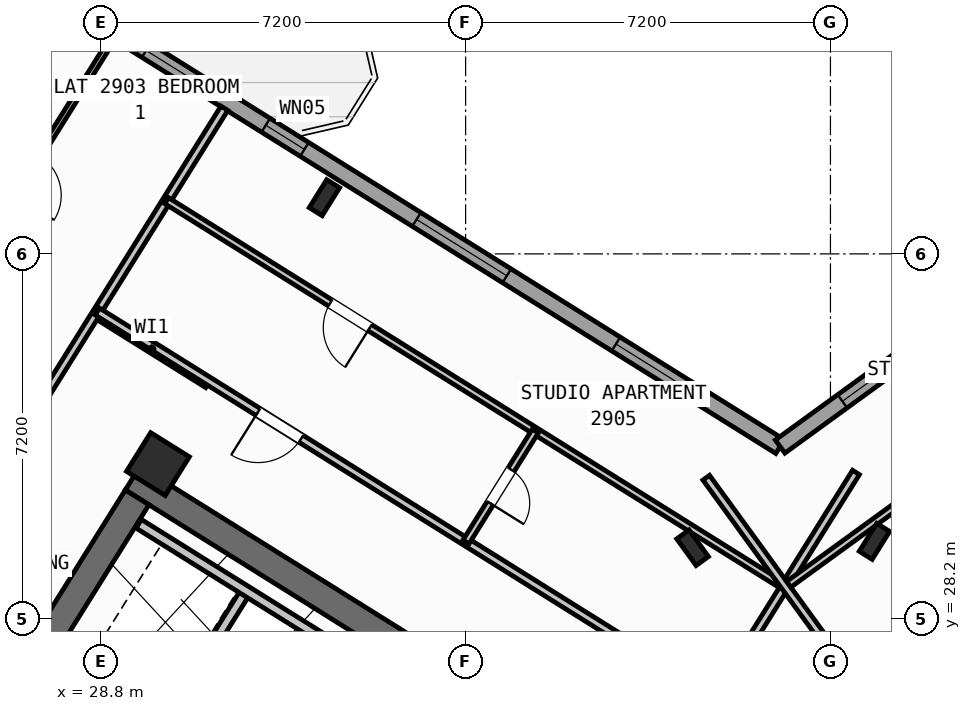
"""IFC4 building model, lengths in metres.
Left out: names, types, materials, properties, quantities, classifications, styles, units other than length and angle.
Written with IfcOpenShell. Run it as: python <this file> out.ifc"""

import sys

from ifc_helpers import new_model, si_unit, direction, frame, frame_2d, origin, origin_2d, place, context, subcontext, project, spatial, rectangle, hollow_rectangle, i_section, extrude, source, transform, mapped, element, fill, save


model = new_model("IFC4")
c1 = context("Model", 3, precision=1e-05, world=origin(), true_north=direction((0.0, 1.0)))
c2 = subcontext(c1, "Body", "Model", "MODEL_VIEW")
j1 = project(units=[si_unit("LENGTHUNIT", "METRE"), si_unit("PLANEANGLEUNIT", "RADIAN")], contexts=[c1])
p1 = place(None, origin())
s1 = spatial("IfcSite", under=j1, at=p1, CompositionType="ELEMENT")
p2 = place(p1, origin())
s2 = spatial("IfcBuilding", under=s1, at=p2, CompositionType="ELEMENT")
p3 = place(p2, frame((0.0, 0.0, 116.1)))
s3 = spatial("IfcBuildingStorey", under=s2, at=p3, CompositionType="ELEMENT", Elevation=116.1)
p4 = place(p3, frame((40.573, 24.01, 0.0), z_axis=(0.0, 0.0, 1.0), x_axis=(-0.848047359947, 0.529920442413, 0.0)))
e1 = element("IfcWall", 1, at=p4, inside=s3, PredefinedType="SHEAR", context=c2, shape_type="SweptSolid", body=[
    extrude(rectangle(XDim=13.14, YDim=0.55, at=frame_2d((6.57, 0.0))), origin(), (0.0, 0.0, 1.0), 3.35),
])
p5 = place(p3, frame((29.517, 30.594, 0.0), z_axis=(0.0, 0.0, 1.0), x_axis=(-0.529906864564, -0.848055844204, 0.0)))
e2 = element("IfcWall", 2, at=p5, inside=s3, PredefinedType="SHEAR", context=c2, shape_type="SweptSolid", body=[
    extrude(rectangle(XDim=3.575, YDim=0.55, at=frame_2d((1.788, 0.0))), origin(), (0.0, 0.0, 1.0), 3.35),
])
p6 = place(p3, frame((44.365, 24.142, 0.0), z_axis=(0.0, 0.0, 1.0), x_axis=(0.809024304885, 0.587775190107, 0.0)))
e3 = element("IfcWall", 3, at=p6, inside=s3, PredefinedType="SHEAR", context=c2, shape_type="SweptSolid", body=[
    extrude(rectangle(XDim=12.34, YDim=0.55, at=frame_2d((6.17, 0.0))), origin(), (0.0, 0.0, 1.0), 3.35),
])
m1 = source(origin(), c2, "Body", "SweptSolid", [
    extrude(i_section(OverallWidth=0.3, OverallDepth=0.65, WebThickness=0.016, FlangeThickness=0.031, at=origin_2d()), origin(), (0.0, 0.0, 1.0), 3.6),
])
for number, where, z_axis, x_axis in (
    (4, (44.068, 29.726, 0.0), (0.0, 0.0, 1.0), (-0.848, 0.53, 0.0)),
    (5, (33.213, 36.509, 0.0), (0.0, 0.0, 1.0), (-0.848, 0.53, 0.0)),
):
    element("IfcColumn", number, at=place(p3, frame(where, z_axis=z_axis, x_axis=x_axis)), inside=s3, PredefinedType="COLUMN", context=c2, shape_type="MappedRepresentation", body=[
        mapped(m1, transform((0.0, 0.0, 0.0), scale=1.0)),
    ])
m2 = source(origin(), c2, "Body", "SweptSolid", [
    extrude(hollow_rectangle(XDim=0.9, YDim=0.9, WallThickness=0.036, at=origin_2d()), origin(), (0.0, 0.0, 1.0), 3.6),
])
p7 = place(p3, frame((29.928, 31.251, 0.0), z_axis=(0.0, 0.0, 1.0), x_axis=(-0.848048096156, 0.529919264233, 0.0)))
e6 = element("IfcColumn", 6, at=p7, inside=s3, PredefinedType="COLUMN", context=c2, shape_type="MappedRepresentation", body=[
    mapped(m2, transform((0.0, 0.0, 0.0), scale=1.0)),
])
p8 = place(p3, frame((40.479, 29.601, 0.0), z_axis=(0.0, 0.0, 1.0), x_axis=(0.809016994375, 0.587785252292, 0.0)))
e7 = element("IfcColumn", 7, at=p8, inside=s3, PredefinedType="COLUMN", context=c2, shape_type="MappedRepresentation", body=[
    mapped(m1, transform((0.0, 0.0, 0.0), scale=1.0)),
])
p9 = place(p3, frame((31.76, 12.183, 0.0), z_axis=(0.0, 0.0, 1.0), x_axis=(-0.848047074256, 0.529920899612, 0.0)))
e8 = element("IfcWall", 8, at=p9, inside=s3, PredefinedType="STANDARD", context=c2, shape_type="SweptSolid", body=[
    extrude(rectangle(XDim=30.652, YDim=0.32, at=frame_2d((15.326, 0.0))), origin(), (0.0, 0.0, 1.0), 3.35),
])
p10 = place(p9, frame((15.153, 0.0, 0.0)))
e9 = element("IfcOpeningElement", 9, at=p10, cuts=e8, PredefinedType="OPENING", context=c2, shape_type="SweptSolid", body=[
    extrude(rectangle(XDim=1.2, YDim=2.15, at=frame_2d((0.6, 1.075))), frame((0.0, 0.17, 0.0), z_axis=(0.0, -1.0, 0.0), x_axis=(1.0, 0.0, 0.0)), (0.0, 0.0, 1.0), 0.34),
])
p11 = place(p9, frame((2.002, 0.0, 0.8)))
e10 = element("IfcOpeningElement", 10, at=p11, cuts=e8, PredefinedType="OPENING", context=c2, shape_type="SweptSolid", body=[
    extrude(rectangle(XDim=2.1, YDim=1.55, at=frame_2d((1.05, 0.775))), frame((0.0, 0.17, 0.0), z_axis=(0.0, -1.0, 0.0), x_axis=(1.0, 0.0, 0.0)), (0.0, 0.0, 1.0), 0.34),
])
p12 = place(p9, frame((7.206, 0.0, 0.8)))
e11 = element("IfcOpeningElement", 11, at=p12, cuts=e8, PredefinedType="OPENING", context=c2, shape_type="SweptSolid", body=[
    extrude(rectangle(XDim=2.1, YDim=1.55, at=frame_2d((1.05, 0.775))), frame((0.0, 0.17, 0.0), z_axis=(0.0, -1.0, 0.0), x_axis=(1.0, 0.0, 0.0)), (0.0, 0.0, 1.0), 0.34),
])
p13 = place(p9, frame((12.648, 0.0, 1.0)))
e12 = element("IfcOpeningElement", 12, at=p13, cuts=e8, PredefinedType="OPENING", context=c2, shape_type="SweptSolid", body=[
    extrude(rectangle(XDim=0.9, YDim=1.25, at=frame_2d((0.45, 0.625))), frame((0.0, 0.17, 0.0), z_axis=(0.0, -1.0, 0.0), x_axis=(1.0, 0.0, 0.0)), (0.0, 0.0, 1.0), 0.34),
])
p14 = place(p9, frame((19.458, 0.0, 0.95)))
e13 = element("IfcOpeningElement", 13, at=p14, cuts=e8, PredefinedType="OPENING", context=c2, shape_type="SweptSolid", body=[
    extrude(rectangle(XDim=1.2, YDim=1.4, at=frame_2d((0.6, 0.7))), frame((0.0, 0.17, 0.0), z_axis=(0.0, -1.0, 0.0), x_axis=(1.0, 0.0, 0.0)), (0.0, 0.0, 1.0), 0.34),
])
p15 = place(p9, frame((21.858, 0.0, 0.95)))
e14 = element("IfcOpeningElement", 14, at=p15, cuts=e8, PredefinedType="OPENING", context=c2, shape_type="SweptSolid", body=[
    extrude(rectangle(XDim=1.2, YDim=1.4, at=frame_2d((0.6, 0.7))), frame((0.0, 0.17, 0.0), z_axis=(0.0, -1.0, 0.0), x_axis=(1.0, 0.0, 0.0)), (0.0, 0.0, 1.0), 0.34),
])
p16 = place(p9, frame((27.266, 0.0, 0.8)))
e15 = element("IfcOpeningElement", 15, at=p16, cuts=e8, PredefinedType="OPENING", context=c2, shape_type="SweptSolid", body=[
    extrude(rectangle(XDim=2.1, YDim=1.55, at=frame_2d((1.05, 0.775))), frame((0.0, 0.17, 0.0), z_axis=(0.0, -1.0, 0.0), x_axis=(1.0, 0.0, 0.0)), (0.0, 0.0, 1.0), 0.34),
])
p17 = place(p3, frame((17.424, 47.083, 0.0), z_axis=(0.0, 0.0, 1.0), x_axis=(0.848049927979, -0.529916332693, 0.0)))
e16 = element("IfcWall", 16, at=p17, inside=s3, PredefinedType="STANDARD", context=c2, shape_type="SweptSolid", body=[
    extrude(rectangle(XDim=29.223, YDim=0.32, at=frame_2d((14.612, 0.0))), origin(), (0.0, 0.0, 1.0), 3.35),
])
p18 = place(p17, frame((8.839, 0.0, 0.0)))
e17 = element("IfcOpeningElement", 17, at=p18, cuts=e16, PredefinedType="OPENING", context=c2, shape_type="SweptSolid", body=[
    extrude(rectangle(XDim=1.05, YDim=2.15, at=frame_2d((0.525, 1.075))), frame((0.0, 0.17, 0.0), z_axis=(0.0, -1.0, 0.0), x_axis=(1.0, 0.0, 0.0)), (0.0, 0.0, 1.0), 0.34),
])
p19 = place(p17, frame((0.719, 0.0, 0.85)))
e18 = element("IfcOpeningElement", 18, at=p19, cuts=e16, PredefinedType="OPENING", context=c2, shape_type="SweptSolid", body=[
    extrude(rectangle(XDim=1.8, YDim=1.5, at=frame_2d((0.9, 0.75))), frame((0.0, 0.17, 0.0), z_axis=(0.0, -1.0, 0.0), x_axis=(1.0, 0.0, 0.0)), (0.0, 0.0, 1.0), 0.34),
])
p20 = place(p17, frame((3.981, 0.0, 0.85)))
e19 = element("IfcOpeningElement", 19, at=p20, cuts=e16, PredefinedType="OPENING", context=c2, shape_type="SweptSolid", body=[
    extrude(rectangle(XDim=1.5, YDim=1.5, at=frame_2d((0.75, 0.75))), frame((0.0, 0.17, 0.0), z_axis=(0.0, -1.0, 0.0), x_axis=(1.0, 0.0, 0.0)), (0.0, 0.0, 1.0), 0.34),
])
p21 = place(p17, frame((7.021, 0.0, 0.95)))
e20 = element("IfcOpeningElement", 20, at=p21, cuts=e16, PredefinedType="OPENING", context=c2, shape_type="SweptSolid", body=[
    extrude(rectangle(XDim=1.2, YDim=1.4, at=frame_2d((0.6, 0.7))), frame((0.0, 0.17, 0.0), z_axis=(0.0, -1.0, 0.0), x_axis=(1.0, 0.0, 0.0)), (0.0, 0.0, 1.0), 0.34),
])
p22 = place(p17, frame((14.471, 0.0, 0.95)))
e21 = element("IfcOpeningElement", 21, at=p22, cuts=e16, PredefinedType="OPENING", context=c2, shape_type="SweptSolid", body=[
    extrude(rectangle(XDim=1.2, YDim=1.4, at=frame_2d((0.6, 0.7))), frame((0.0, 0.17, 0.0), z_axis=(0.0, -1.0, 0.0), x_axis=(1.0, 0.0, 0.0)), (0.0, 0.0, 1.0), 0.34),
])
p23 = place(p17, frame((17.254, 0.0, 1.0)))
e22 = element("IfcOpeningElement", 22, at=p23, cuts=e16, PredefinedType="OPENING", context=c2, shape_type="SweptSolid", body=[
    extrude(rectangle(XDim=0.9, YDim=1.25, at=frame_2d((0.45, 0.625))), frame((0.0, 0.17, 0.0), z_axis=(0.0, -1.0, 0.0), x_axis=(1.0, 0.0, 0.0)), (0.0, 0.0, 1.0), 0.34),
])
p24 = place(p17, frame((20.764, 0.0, 0.8)))
e23 = element("IfcOpeningElement", 23, at=p24, cuts=e16, PredefinedType="OPENING", context=c2, shape_type="SweptSolid", body=[
    extrude(rectangle(XDim=2.1, YDim=1.55, at=frame_2d((1.05, 0.775))), frame((0.0, 0.17, 0.0), z_axis=(0.0, -1.0, 0.0), x_axis=(1.0, 0.0, 0.0)), (0.0, 0.0, 1.0), 0.34),
])
p25 = place(p17, frame((25.403, 0.0, 0.8)))
e24 = element("IfcOpeningElement", 24, at=p25, cuts=e16, PredefinedType="OPENING", context=c2, shape_type="SweptSolid", body=[
    extrude(rectangle(XDim=2.1, YDim=1.55, at=frame_2d((1.05, 0.775))), frame((0.0, 0.17, 0.0), z_axis=(0.0, -1.0, 0.0), x_axis=(1.0, 0.0, 0.0)), (0.0, 0.0, 1.0), 0.34),
])
p26 = place(p3, frame((42.207, 31.597, 0.0), z_axis=(0.0, 0.0, 1.0), x_axis=(0.809020333377, 0.587780656523, 0.0)))
e25 = element("IfcWall", 25, at=p26, inside=s3, PredefinedType="STANDARD", context=c2, shape_type="SweptSolid", body=[
    extrude(rectangle(XDim=15.223, YDim=0.32, at=frame_2d((7.611, 0.0))), origin(), (0.0, 0.0, 1.0), 3.35),
])
p27 = place(p26, frame((12.82, 0.0, 0.0)))
e26 = element("IfcOpeningElement", 26, at=p27, cuts=e25, PredefinedType="OPENING", context=c2, shape_type="SweptSolid", body=[
    extrude(rectangle(XDim=1.05, YDim=2.15, at=frame_2d((0.525, 1.075))), frame((0.0, 0.17, 0.0), z_axis=(0.0, -1.0, 0.0), x_axis=(1.0, 0.0, 0.0)), (0.0, 0.0, 1.0), 0.34),
])
p28 = place(p26, frame((1.52, 0.0, 0.8)))
e27 = element("IfcOpeningElement", 27, at=p28, cuts=e25, PredefinedType="OPENING", context=c2, shape_type="SweptSolid", body=[
    extrude(rectangle(XDim=2.1, YDim=1.55, at=frame_2d((1.05, 0.775))), frame((0.0, 0.17, 0.0), z_axis=(0.0, -1.0, 0.0), x_axis=(1.0, 0.0, 0.0)), (0.0, 0.0, 1.0), 0.34),
])
p29 = place(p26, frame((5.76, 0.0, 0.8)))
e28 = element("IfcOpeningElement", 28, at=p29, cuts=e25, PredefinedType="OPENING", context=c2, shape_type="SweptSolid", body=[
    extrude(rectangle(XDim=2.1, YDim=1.55, at=frame_2d((1.05, 0.775))), frame((0.0, 0.17, 0.0), z_axis=(0.0, -1.0, 0.0), x_axis=(1.0, 0.0, 0.0)), (0.0, 0.0, 1.0), 0.34),
])
p30 = place(p26, frame((10.219, 0.0, 1.0)))
e29 = element("IfcOpeningElement", 29, at=p30, cuts=e25, PredefinedType="OPENING", context=c2, shape_type="SweptSolid", body=[
    extrude(rectangle(XDim=0.9, YDim=1.25, at=frame_2d((0.45, 0.625))), frame((0.0, 0.17, 0.0), z_axis=(0.0, -1.0, 0.0), x_axis=(1.0, 0.0, 0.0)), (0.0, 0.0, 1.0), 0.34),
])
p31 = place(p3, frame((31.645, 28.716, 0.0), z_axis=(0.0, 0.0, 1.0), x_axis=(-0.52986693015, -0.848080795876, 0.0)))
e30 = element("IfcWall", 30, at=p31, inside=s3, PredefinedType="STANDARD", context=c2, shape_type="SweptSolid", body=[
    extrude(rectangle(XDim=2.66, YDim=0.2, at=frame_2d((1.33, 0.0))), origin(), (0.0, 0.0, 1.0), 3.34),
])
p32 = place(p3, frame((33.363, 27.69, 0.0), z_axis=(0.0, 0.0, 1.0), x_axis=(-0.848047090064, 0.529920874315, 0.0)))
e31 = element("IfcWall", 31, at=p32, inside=s3, PredefinedType="STANDARD", context=c2, shape_type="SweptSolid", body=[
    extrude(rectangle(XDim=4.498, YDim=0.2, at=frame_2d((2.249, 0.0))), origin(), (0.0, 0.0, 1.0), 3.34),
])
p33 = place(p3, frame((30.914, 32.829, 0.0), z_axis=(0.0, 0.0, 1.0), x_axis=(-0.848008813643, 0.529982124211, 0.0)))
e32 = element("IfcWall", 32, at=p33, inside=s3, PredefinedType="PARTITIONING", context=c2, shape_type="SweptSolid", body=[
    extrude(rectangle(XDim=2.61, YDim=0.16, at=frame_2d((1.305, 0.0))), origin(), (0.0, 0.0, 1.0), 3.34),
])
p34 = place(p3, frame((31.239, 38.274, 0.0), z_axis=(0.0, 0.0, 1.0), x_axis=(-0.529920220799, -0.848047498427, 0.0)))
e33 = element("IfcWall", 33, at=p34, inside=s3, PredefinedType="PARTITIONING", context=c2, shape_type="SweptSolid", body=[
    extrude(rectangle(XDim=9.2, YDim=0.16, at=frame_2d((4.6, 0.0))), origin(), (0.0, 0.0, 1.0), 3.34),
])
p35 = place(p3, frame((29.177, 39.881, 0.0), z_axis=(0.0, 0.0, 1.0), x_axis=(-0.529930649952, -0.848040981463, 0.0)))
e34 = element("IfcWall", 34, at=p35, inside=s3, PredefinedType="PARTITIONING", context=c2, shape_type="SweptSolid", body=[
    extrude(rectangle(XDim=7.07, YDim=0.11, at=frame_2d((3.535, 0.0))), origin(), (0.0, 0.0, 1.0), 3.34),
])
p36 = place(p35, frame((3.0, 0.0, 0.0)))
e35 = element("IfcOpeningElement", 35, at=p36, cuts=e34, PredefinedType="OPENING", context=c2, shape_type="SweptSolid", body=[
    extrude(rectangle(XDim=0.92, YDim=2.08, at=frame_2d((0.46, 1.04))), frame((0.0, 0.065, 0.0), z_axis=(0.0, -1.0, 0.0), x_axis=(1.0, 0.0, 0.0)), (0.0, 0.0, 1.0), 0.13),
])
p37 = place(p3, frame((41.936, 26.012, 0.0), z_axis=(0.0, 0.0, 1.0), x_axis=(-0.848051154596, 0.529914369676, 0.0)))
e36 = element("IfcWall", 36, at=p37, inside=s3, PredefinedType="PARTITIONING", context=c2, shape_type="SweptSolid", body=[
    extrude(rectangle(XDim=15.57, YDim=0.16, at=frame_2d((7.785, 0.0))), origin(), (0.0, 0.0, 1.0), 3.34),
])
p38 = place(p37, frame((10.83, 0.0, 0.0)))
e37 = element("IfcOpeningElement", 37, at=p38, cuts=e36, PredefinedType="OPENING", context=c2, shape_type="SweptSolid", body=[
    extrude(rectangle(XDim=1.0, YDim=2.1, at=frame_2d((0.5, 1.05))), frame((0.0, 0.09, 0.0), z_axis=(0.0, -1.0, 0.0), x_axis=(1.0, 0.0, 0.0)), (0.0, 0.0, 1.0), 0.18),
])
p39 = place(p3, frame((43.704, 31.086, 0.0), z_axis=(0.0, 0.0, 1.0), x_axis=(-0.529906828443, -0.848055866774, 0.0)))
e38 = element("IfcWall", 38, at=p39, inside=s3, PredefinedType="PARTITIONING", context=c2, shape_type="SweptSolid", body=[
    extrude(rectangle(XDim=5.48, YDim=0.16, at=frame_2d((2.74, 0.0))), origin(), (0.0, 0.0, 1.0), 3.34),
])
p40 = place(p3, frame((42.226, 28.873, 0.0), z_axis=(0.0, 0.0, 1.0), x_axis=(-0.848049134363, 0.529917602752, 0.0)))
e39 = element("IfcWall", 39, at=p40, inside=s3, PredefinedType="PLUMBINGWALL", context=c2, shape_type="SweptSolid", body=[
    extrude(rectangle(XDim=14.3, YDim=0.14, at=frame_2d((7.15, 0.0))), origin(), (0.0, 0.0, 1.0), 3.34),
])
p41 = place(p40, frame((9.57, 0.0, 0.0)))
e40 = element("IfcOpeningElement", 40, at=p41, cuts=e39, PredefinedType="OPENING", context=c2, shape_type="SweptSolid", body=[
    extrude(rectangle(XDim=0.92, YDim=2.08, at=frame_2d((0.46, 1.04))), frame((0.0, 0.08, 0.0), z_axis=(0.0, -1.0, 0.0), x_axis=(1.0, 0.0, 0.0)), (0.0, 0.0, 1.0), 0.16),
])
p42 = place(p3, frame((37.375, 31.904, 0.0), z_axis=(0.0, 0.0, 1.0), x_axis=(-0.529913878929, -0.848051461244, 0.0)))
e41 = element("IfcWall", 41, at=p42, inside=s3, PredefinedType="PLUMBINGWALL", context=c2, shape_type="SweptSolid", body=[
    extrude(rectangle(XDim=2.58, YDim=0.14, at=frame_2d((1.29, 0.0))), origin(), (0.0, 0.0, 1.0), 3.34),
])
p43 = place(p42, frame((0.9, 0.0, 0.0)))
e42 = element("IfcOpeningElement", 42, at=p43, cuts=e41, PredefinedType="OPENING", context=c2, shape_type="SweptSolid", body=[
    extrude(rectangle(XDim=0.78, YDim=2.05, at=frame_2d((0.39, 1.025))), frame((0.0, 0.08, 0.0), z_axis=(0.0, -1.0, 0.0), x_axis=(1.0, 0.0, 0.0)), (0.0, 0.0, 1.0), 0.16),
])
p44 = place(p3, frame((42.866, 26.044, 0.0), z_axis=(0.0, 0.0, 1.0), x_axis=(0.809020254154, 0.587780765566, 0.0)))
e43 = element("IfcWall", 43, at=p44, inside=s3, PredefinedType="PARTITIONING", context=c2, shape_type="SweptSolid", body=[
    extrude(rectangle(XDim=14.67, YDim=0.16, at=frame_2d((7.335, 0.0))), origin(), (0.0, 0.0, 1.0), 3.34),
])
p45 = place(p44, frame((10.2, 0.0, 0.0)))
e44 = element("IfcOpeningElement", 44, at=p45, cuts=e43, PredefinedType="OPENING", context=c2, shape_type="SweptSolid", body=[
    extrude(rectangle(XDim=1.0, YDim=2.1, at=frame_2d((0.5, 1.05))), frame((0.0, 0.09, 0.0), z_axis=(0.0, -1.0, 0.0), x_axis=(1.0, 0.0, 0.0)), (0.0, 0.0, 1.0), 0.18),
])
p46 = place(p3, frame((43.969, 26.55, 0.0), z_axis=(0.0, 0.0, 1.0), x_axis=(-0.587776919386, 0.80902304852, 0.0)))
e45 = element("IfcWall", 45, at=p46, inside=s3, PredefinedType="PARTITIONING", context=c2, shape_type="SweptSolid", body=[
    extrude(rectangle(XDim=5.48, YDim=0.16, at=frame_2d((2.74, 0.0))), origin(), (0.0, 0.0, 1.0), 3.34),
])
p47 = place(p3, frame((42.377, 28.878, 0.0), z_axis=(0.0, 0.0, 1.0), x_axis=(0.809020411523, 0.587780548963, 0.0)))
e46 = element("IfcWall", 46, at=p47, inside=s3, PredefinedType="PLUMBINGWALL", context=c2, shape_type="SweptSolid", body=[
    extrude(rectangle(XDim=13.4, YDim=0.14, at=frame_2d((6.7, 0.0))), origin(), (0.0, 0.0, 1.0), 3.34),
])
p48 = place(p47, frame((8.94, 0.0, 0.0)))
e47 = element("IfcOpeningElement", 47, at=p48, cuts=e46, PredefinedType="OPENING", context=c2, shape_type="SweptSolid", body=[
    extrude(rectangle(XDim=0.92, YDim=2.08, at=frame_2d((0.46, 1.04))), frame((0.0, 0.08, 0.0), z_axis=(0.0, -1.0, 0.0), x_axis=(1.0, 0.0, 0.0)), (0.0, 0.0, 1.0), 0.16),
])
m3 = source(origin(), c2, "Body", "SweptSolid", [
    extrude(rectangle(XDim=1.2, YDim=1.4, at=frame_2d((0.6, 0.7))), frame((0.0, 0.03, 0.0), z_axis=(0.0, -1.0, 0.0), x_axis=(1.0, 0.0, 0.0)), (0.0, 0.0, 1.0), 0.06),
])
p49 = place(p22, origin())
e48 = element("IfcWindow", 48, at=p49, inside=s3, PartitioningType="SINGLE_PANEL", PredefinedType="WINDOW", context=c2, shape_type="MappedRepresentation", body=[
    mapped(m3, transform((0.0, 0.0, 0.0), scale=1.0)),
])
fill(e21, e48)
m4 = source(origin(), c2, "Body", "SweptSolid", [
    extrude(rectangle(XDim=0.9, YDim=1.25, at=frame_2d((0.45, 0.625))), frame((0.0, 0.03, 0.0), z_axis=(0.0, -1.0, 0.0), x_axis=(1.0, 0.0, 0.0)), (0.0, 0.0, 1.0), 0.06),
])
p50 = place(p23, origin())
e49 = element("IfcWindow", 49, at=p50, inside=s3, PartitioningType="SINGLE_PANEL", PredefinedType="WINDOW", context=c2, shape_type="MappedRepresentation", body=[
    mapped(m4, transform((0.0, 0.0, 0.0), scale=1.0)),
])
fill(e22, e49)
m5 = source(origin(), c2, "Body", "SweptSolid", [
    extrude(rectangle(XDim=2.1, YDim=1.55, at=frame_2d((1.05, 0.775))), frame((0.0, 0.03, 0.0), z_axis=(0.0, -1.0, 0.0), x_axis=(1.0, 0.0, 0.0)), (0.0, 0.0, 1.0), 0.06),
])
p51 = place(p24, origin())
e50 = element("IfcWindow", 50, at=p51, inside=s3, PartitioningType="SINGLE_PANEL", PredefinedType="WINDOW", context=c2, shape_type="MappedRepresentation", body=[
    mapped(m5, transform((0.0, 0.0, 0.0), scale=1.0)),
])
fill(e23, e50)
p52 = place(p25, origin())
e51 = element("IfcWindow", 51, at=p52, inside=s3, PartitioningType="SINGLE_PANEL", PredefinedType="WINDOW", context=c2, shape_type="MappedRepresentation", body=[
    mapped(m5, transform((0.0, 0.0, 0.0), scale=1.0)),
])
fill(e24, e51)
p53 = place(p28, origin())
e52 = element("IfcWindow", 52, at=p53, inside=s3, PartitioningType="SINGLE_PANEL", PredefinedType="WINDOW", context=c2, shape_type="MappedRepresentation", body=[
    mapped(m5, transform((0.0, 0.0, 0.0), scale=1.0)),
])
fill(e27, e52)
m6 = source(origin(), c2, "Body", "SweptSolid", [
    extrude(rectangle(XDim=1.0, YDim=2.1, at=frame_2d((0.5, 1.05))), frame((0.0, 0.025, 0.0), z_axis=(0.0, -1.0, 0.0), x_axis=(1.0, 0.0, 0.0)), (0.0, 0.0, 1.0), 0.05),
])
p54 = place(p38, origin())
e53 = element("IfcDoor", 53, at=p54, inside=s3, OperationType="SINGLE_SWING_RIGHT", PredefinedType="DOOR", context=c2, shape_type="MappedRepresentation", body=[
    mapped(m6, transform((0.0, 0.0, 0.0), scale=1.0)),
])
fill(e37, e53)
m7 = source(origin(), c2, "Body", "SweptSolid", [
    extrude(rectangle(XDim=0.92, YDim=2.08, at=frame_2d((0.46, 1.04))), frame((0.0, 0.025, 0.0), z_axis=(0.0, -1.0, 0.0), x_axis=(1.0, 0.0, 0.0)), (0.0, 0.0, 1.0), 0.05),
])
p55 = place(p41, origin())
e54 = element("IfcDoor", 54, at=p55, inside=s3, OperationType="SINGLE_SWING_LEFT", PredefinedType="DOOR", context=c2, shape_type="MappedRepresentation", body=[
    mapped(m7, transform((0.0, 0.0, 0.0), scale=1.0)),
])
fill(e40, e54)
m8 = source(origin(), c2, "Body", "SweptSolid", [
    extrude(rectangle(XDim=0.78, YDim=2.05, at=frame_2d((0.39, 1.025))), frame((0.0, 0.025, 0.0), z_axis=(0.0, -1.0, 0.0), x_axis=(1.0, 0.0, 0.0)), (0.0, 0.0, 1.0), 0.05),
])
p56 = place(p43, origin())
e55 = element("IfcDoor", 55, at=p56, inside=s3, OperationType="SINGLE_SWING_RIGHT", PredefinedType="DOOR", context=c2, shape_type="MappedRepresentation", body=[
    mapped(m8, transform((0.0, 0.0, 0.0), scale=1.0)),
])
fill(e42, e55)
save(model, sys.argv[1])
